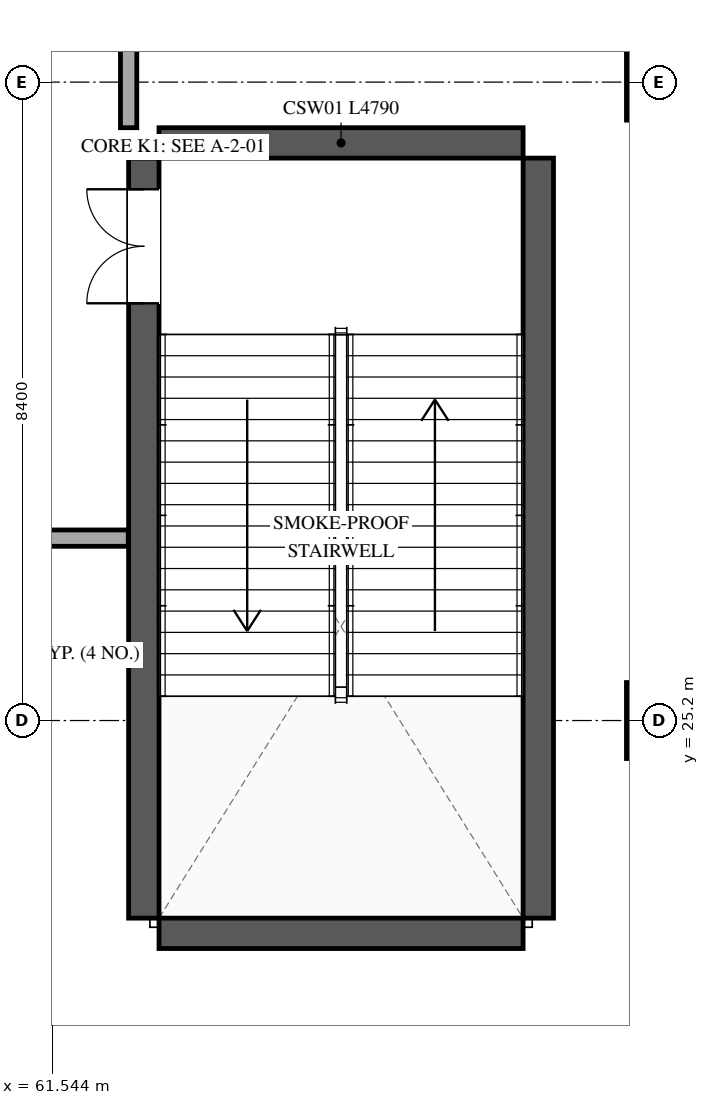
"""IFC4 building model, lengths in metres.
Left out: names, types, materials, properties, quantities, classifications, styles, units other than length and angle.
Written with IfcOpenShell. Run it as: python <this file> out.ifc"""

import sys

from ifc_helpers import new_model, si_unit, direction, frame, frame_2d, origin, origin_2d, place, context, subcontext, project, spatial, rectangle, extrude, element, fill, save


model = new_model("IFC4")
c1 = context("Model", 3, precision=1e-05, world=origin(), true_north=direction((0.0, 1.0)))
c2 = subcontext(c1, "Body", "Model", "MODEL_VIEW")
j1 = project(units=[si_unit("LENGTHUNIT", "METRE"), si_unit("PLANEANGLEUNIT", "RADIAN")], contexts=[c1])
p1 = place(None, origin())
s1 = spatial("IfcSite", under=j1, at=p1, CompositionType="ELEMENT")
p2 = place(p1, origin())
s2 = spatial("IfcBuilding", under=s1, at=p2, CompositionType="ELEMENT")
p3 = place(p2, frame((0.0, 0.0, 6.0)))
s3 = spatial("IfcBuildingStorey", under=s2, at=p3, CompositionType="ELEMENT", Elevation=6.0)
for number, where, z_axis, x_axis in (
    (1, (69.6, 25.2, 0.0), (0.0, 0.0, 1.0), (1.0, 0.0, 0.0)),
    (2, (69.6, 33.6, 0.0), (0.0, 0.0, 1.0), (1.0, 0.0, 0.0)),
):
    element("IfcColumn", number, at=place(p3, frame(where, z_axis=z_axis, x_axis=x_axis)), inside=s3, PredefinedType="COLUMN", context=c2, shape_type="SweptSolid", body=[
        extrude(rectangle(XDim=1.0, YDim=1.0, at=origin_2d()), origin(), (0.0, 0.0, 1.0), 5.4),
    ])
p4 = place(p3, frame((62.75, 22.6, 0.0), z_axis=(0.0, 0.0, 1.0), x_axis=(0.0, 1.0, 0.0)))
e3 = element("IfcWall", 3, at=p4, inside=s3, PredefinedType="SHEAR", context=c2, shape_type="SweptSolid", body=[
    extrude(rectangle(XDim=10.0, YDim=0.4, at=frame_2d((5.0, 0.0))), origin(), (0.0, 0.0, 1.0), 5.4),
])
p5 = place(p4, frame((8.09, 0.0, 0.0)))
e4 = element("IfcOpeningElement", 4, at=p5, cuts=e3, PredefinedType="OPENING", context=c2, shape_type="SweptSolid", body=[
    extrude(rectangle(XDim=1.5, YDim=2.2, at=frame_2d((0.75, 1.1))), frame((0.0, 0.21, 0.0), z_axis=(0.0, -1.0, 0.0), x_axis=(1.0, 0.0, 0.0)), (0.0, 0.0, 1.0), 0.42),
])
p6 = place(p3, frame((67.94, 32.6, 0.0), z_axis=(0.0, 0.0, 1.0), x_axis=(0.0, -1.0, 0.0)))
e5 = element("IfcWall", 5, at=p6, inside=s3, PredefinedType="SHEAR", context=c2, shape_type="SweptSolid", body=[
    extrude(rectangle(XDim=10.0, YDim=0.4, at=frame_2d((5.0, 0.0))), origin(), (0.0, 0.0, 1.0), 5.4),
])
for number, where, z_axis, x_axis in (
    (6, (67.74, 22.4, 0.0), (0.0, 0.0, 1.0), (-1.0, 0.0, 0.0)),
    (7, (62.95, 32.8, 0.0), (0.0, 0.0, 1.0), (1.0, 0.0, 0.0)),
):
    element("IfcWall", number, at=place(p3, frame(where, z_axis=z_axis, x_axis=x_axis)), inside=s3, PredefinedType="SHEAR", context=c2, shape_type="SweptSolid", body=[
        extrude(rectangle(XDim=4.79, YDim=0.4, at=frame_2d((2.395, 0.0))), origin(), (0.0, 0.0, 1.0), 5.4),
    ])
p7 = place(p3, frame((62.545, 27.6, 0.0), z_axis=(0.0, 0.0, 1.0), x_axis=(-1.0, 0.0, 0.0)))
e8 = element("IfcWall", 8, at=p7, inside=s3, PredefinedType="PARTITIONING", context=c2, shape_type="SweptSolid", body=[
    extrude(rectangle(XDim=5.745, YDim=0.215, at=frame_2d((2.873, 0.0))), origin(), (0.0, 0.0, 1.0), 4.31),
])
p8 = place(p7, frame((2.198, 0.0, 0.0)))
e9 = element("IfcOpeningElement", 9, at=p8, cuts=e8, PredefinedType="OPENING", context=c2, shape_type="SweptSolid", body=[
    extrude(rectangle(XDim=1.35, YDim=2.2, at=frame_2d((0.675, 1.1))), frame((0.0, 0.118, 0.0), z_axis=(0.0, -1.0, 0.0), x_axis=(1.0, 0.0, 0.0)), (0.0, 0.0, 1.0), 0.235),
])
p9 = place(p3, frame((62.55, 35.0, 0.0), z_axis=(0.0, 0.0, 1.0), x_axis=(0.0, -1.0, 0.0)))
e10 = element("IfcWall", 10, at=p9, inside=s3, PredefinedType="PARTITIONING", context=c2, shape_type="SweptSolid", body=[
    extrude(rectangle(XDim=2.0, YDim=0.215, at=frame_2d((1.0, 0.0))), origin(), (0.0, 0.0, 1.0), 4.31),
])
p10 = place(p5, origin())
e11 = element("IfcDoor", 11, at=p10, inside=s3, OperationType="DOUBLE_DOOR_SINGLE_SWING", PredefinedType="DOOR", context=c2, shape_type="SweptSolid", body=[
    extrude(rectangle(XDim=1.5, YDim=2.2, at=frame_2d((0.75, 1.1))), frame((0.0, 0.025, 0.0), z_axis=(0.0, -1.0, 0.0), x_axis=(1.0, 0.0, 0.0)), (0.0, 0.0, 1.0), 0.05),
])
fill(e4, e11)
save(model, sys.argv[1])
